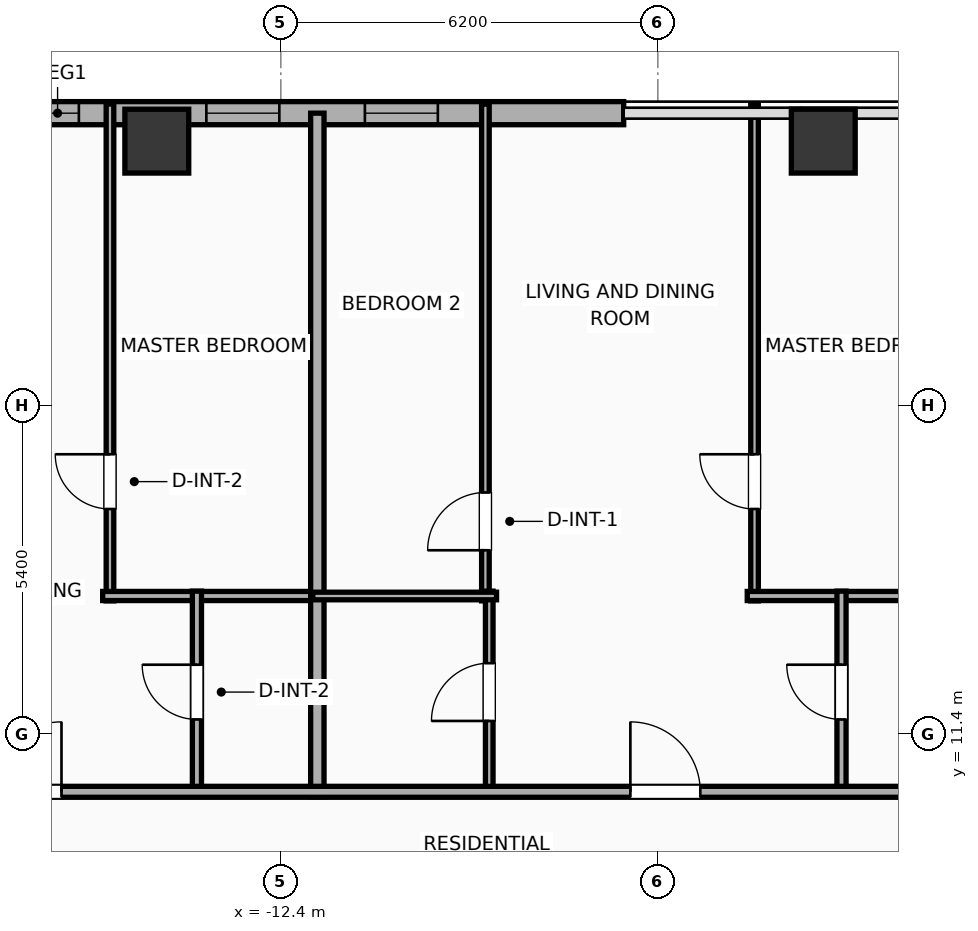
"""IFC4 building model, lengths in metres.
Left out: names, types, materials, properties, quantities, classifications, styles, units other than length and angle.
Written with IfcOpenShell. Run it as: python <this file> out.ifc"""

import sys

from ifc_helpers import new_model, si_unit, direction, frame, frame_2d, origin, origin_2d, place, context, subcontext, project, spatial, rectangle, hollow_rectangle, extrude, element, fill, save


model = new_model("IFC4")
c1 = context("Model", 3, precision=1e-05, world=origin(), true_north=direction((0.0, 1.0)))
c2 = subcontext(c1, "Body", "Model", "MODEL_VIEW")
j1 = project(units=[si_unit("LENGTHUNIT", "METRE"), si_unit("PLANEANGLEUNIT", "RADIAN")], contexts=[c1])
p1 = place(None, origin())
s1 = spatial("IfcSite", under=j1, at=p1, CompositionType="ELEMENT")
p2 = place(p1, origin())
s2 = spatial("IfcBuilding", under=s1, at=p2, CompositionType="ELEMENT")
p3 = place(p2, frame((0.0, 0.0, 117.0)))
s3 = spatial("IfcBuildingStorey", under=s2, at=p3, CompositionType="ELEMENT", Elevation=117.0)
for number, where, z_axis, x_axis in (
    (1, (-3.48, 21.15, 0.0), (0.0, 0.0, 1.0), (1.0, 0.0, 0.0)),
    (2, (-14.44, 21.15, 0.0), (0.0, 0.0, 1.0), (1.0, 0.0, 0.0)),
):
    element("IfcColumn", number, at=place(p3, frame(where, z_axis=z_axis, x_axis=x_axis)), inside=s3, PredefinedType="COLUMN", context=c2, shape_type="SweptSolid", body=[
        extrude(hollow_rectangle(XDim=1.05, YDim=1.05, WallThickness=0.036, at=origin_2d()), origin(), (0.0, 0.0, 1.0), 3.9),
    ])
p4 = place(p3, frame((-25.381, 21.61, 0.0), z_axis=(0.0, 0.0, 1.0), x_axis=(1.0, 0.0, 0.0)))
e3 = element("IfcWall", 3, at=p4, inside=s3, PredefinedType="ELEMENTEDWALL", context=c2, shape_type="SweptSolid", body=[
    extrude(rectangle(XDim=18.619, YDim=0.38, at=frame_2d((9.31, 0.0))), origin(), (0.0, 0.0, 1.0), 3.65),
])
p5 = place(p4, frame((7.26, 0.0, 0.75)))
e4 = element("IfcOpeningElement", 4, at=p5, cuts=e3, PredefinedType="OPENING", context=c2, shape_type="SweptSolid", body=[
    extrude(rectangle(XDim=2.4, YDim=2.1, at=frame_2d((1.2, 1.05))), frame((0.0, 0.2, 0.0), z_axis=(0.0, -1.0, 0.0), x_axis=(1.0, 0.0, 0.0)), (0.0, 0.0, 1.0), 0.4),
])
p6 = place(p4, frame((1.336, 0.0, 0.75)))
e5 = element("IfcOpeningElement", 5, at=p6, cuts=e3, PredefinedType="OPENING", context=c2, shape_type="SweptSolid", body=[
    extrude(rectangle(XDim=1.2, YDim=2.05, at=frame_2d((0.6, 1.025))), frame((0.0, 0.2, 0.0), z_axis=(0.0, -1.0, 0.0), x_axis=(1.0, 0.0, 0.0)), (0.0, 0.0, 1.0), 0.4),
])
p7 = place(p4, frame((3.952, 0.0, 0.75)))
e6 = element("IfcOpeningElement", 6, at=p7, cuts=e3, PredefinedType="OPENING", context=c2, shape_type="SweptSolid", body=[
    extrude(rectangle(XDim=1.2, YDim=2.05, at=frame_2d((0.6, 1.025))), frame((0.0, 0.2, 0.0), z_axis=(0.0, -1.0, 0.0), x_axis=(1.0, 0.0, 0.0)), (0.0, 0.0, 1.0), 0.4),
])
p8 = place(p4, frame((11.756, 0.0, 0.75)))
e7 = element("IfcOpeningElement", 7, at=p8, cuts=e3, PredefinedType="OPENING", context=c2, shape_type="SweptSolid", body=[
    extrude(rectangle(XDim=1.2, YDim=2.05, at=frame_2d((0.6, 1.025))), frame((0.0, 0.2, 0.0), z_axis=(0.0, -1.0, 0.0), x_axis=(1.0, 0.0, 0.0)), (0.0, 0.0, 1.0), 0.4),
])
p9 = place(p4, frame((14.363, 0.0, 0.75)))
e8 = element("IfcOpeningElement", 8, at=p9, cuts=e3, PredefinedType="OPENING", context=c2, shape_type="SweptSolid", body=[
    extrude(rectangle(XDim=1.2, YDim=2.05, at=frame_2d((0.6, 1.025))), frame((0.0, 0.2, 0.0), z_axis=(0.0, -1.0, 0.0), x_axis=(1.0, 0.0, 0.0)), (0.0, 0.0, 1.0), 0.4),
])
p10 = place(p3, frame((-15.21, 13.59, 0.0), z_axis=(0.0, 0.0, 1.0), x_axis=(0.0, 1.0, 0.0)))
e9 = element("IfcWall", 9, at=p10, inside=s3, PredefinedType="PARTITIONING", context=c2, shape_type="SweptSolid", body=[
    extrude(rectangle(XDim=8.17, YDim=0.125, at=frame_2d((4.085, 0.0))), origin(), (0.0, 0.0, 1.0), 3.04),
])
p11 = place(p10, frame((1.511, 0.0, 0.0)))
e10 = element("IfcOpeningElement", 10, at=p11, cuts=e9, PredefinedType="OPENING", context=c2, shape_type="SweptSolid", body=[
    extrude(rectangle(XDim=0.9, YDim=2.05, at=frame_2d((0.45, 1.025))), frame((0.0, 0.073, 0.0), z_axis=(0.0, -1.0, 0.0), x_axis=(1.0, 0.0, 0.0)), (0.0, 0.0, 1.0), 0.145),
])
p12 = place(p3, frame((-15.33, 13.67, 0.0), z_axis=(0.0, 0.0, 1.0), x_axis=(1.0, 0.0, 0.0)))
e11 = element("IfcWall", 11, at=p12, inside=s3, PredefinedType="PLUMBINGWALL", context=c2, shape_type="SweptSolid", body=[
    extrude(rectangle(XDim=3.605, YDim=0.15, at=frame_2d((1.802, 0.0))), origin(), (0.0, 0.0, 1.0), 3.65),
])
p13 = place(p3, frame((-13.78, 10.43, 0.0), z_axis=(0.0, 0.0, 1.0), x_axis=(0.0, 1.0, 0.0)))
e12 = element("IfcWall", 12, at=p13, inside=s3, PredefinedType="PLUMBINGWALL", context=c2, shape_type="SweptSolid", body=[
    extrude(rectangle(XDim=3.32, YDim=0.15, at=frame_2d((1.66, 0.0))), origin(), (0.0, 0.0, 1.0), 3.65),
])
p14 = place(p13, frame((1.21, 0.0, 0.0)))
e13 = element("IfcOpeningElement", 13, at=p14, cuts=e12, PredefinedType="OPENING", context=c2, shape_type="SweptSolid", body=[
    extrude(rectangle(XDim=0.9, YDim=2.05, at=frame_2d((0.45, 1.025))), frame((0.0, 0.085, 0.0), z_axis=(0.0, -1.0, 0.0), x_axis=(1.0, 0.0, 0.0)), (0.0, 0.0, 1.0), 0.17),
])
p15 = place(p3, frame((-11.8, 10.37, 0.0), z_axis=(0.0, 0.0, 1.0), x_axis=(0.0, 1.0, 0.0)))
e14 = element("IfcWall", 14, at=p15, inside=s3, PredefinedType="PARTITIONING", context=c2, shape_type="SweptSolid", body=[
    extrude(rectangle(XDim=11.24, YDim=0.22, at=frame_2d((5.62, 0.0))), origin(), (0.0, 0.0, 1.0), 3.65),
])
p16 = place(p3, frame((-9.036, 13.59, 0.0), z_axis=(0.0, 0.0, 1.0), x_axis=(0.0, 1.0, 0.0)))
e15 = element("IfcWall", 15, at=p16, inside=s3, PredefinedType="PARTITIONING", context=c2, shape_type="SweptSolid", body=[
    extrude(rectangle(XDim=8.17, YDim=0.125, at=frame_2d((4.085, 0.0))), origin(), (0.0, 0.0, 1.0), 3.65),
])
p17 = place(p16, frame((0.832, 0.0, 0.0)))
e16 = element("IfcOpeningElement", 16, at=p17, cuts=e15, PredefinedType="OPENING", context=c2, shape_type="SweptSolid", body=[
    extrude(rectangle(XDim=0.95, YDim=2.05, at=frame_2d((0.475, 1.025))), frame((0.0, 0.073, 0.0), z_axis=(0.0, -1.0, 0.0), x_axis=(1.0, 0.0, 0.0)), (0.0, 0.0, 1.0), 0.145),
])
p18 = place(p3, frame((-4.61, 13.59, 0.0), z_axis=(0.0, 0.0, 1.0), x_axis=(0.0, 1.0, 0.0)))
e17 = element("IfcWall", 17, at=p18, inside=s3, PredefinedType="PARTITIONING", context=c2, shape_type="SweptSolid", body=[
    extrude(rectangle(XDim=8.17, YDim=0.125, at=frame_2d((4.085, 0.0))), origin(), (0.0, 0.0, 1.0), 3.65),
])
p19 = place(p18, frame((1.511, 0.0, 0.0)))
e18 = element("IfcOpeningElement", 18, at=p19, cuts=e17, PredefinedType="OPENING", context=c2, shape_type="SweptSolid", body=[
    extrude(rectangle(XDim=0.9, YDim=2.05, at=frame_2d((0.45, 1.025))), frame((0.0, 0.073, 0.0), z_axis=(0.0, -1.0, 0.0), x_axis=(1.0, 0.0, 0.0)), (0.0, 0.0, 1.0), 0.145),
])
p20 = place(p3, frame((-4.73, 13.67, 0.0), z_axis=(0.0, 0.0, 1.0), x_axis=(1.0, 0.0, 0.0)))
e19 = element("IfcWall", 19, at=p20, inside=s3, PredefinedType="PLUMBINGWALL", context=c2, shape_type="SweptSolid", body=[
    extrude(rectangle(XDim=3.605, YDim=0.15, at=frame_2d((1.802, 0.0))), origin(), (0.0, 0.0, 1.0), 3.65),
])
p21 = place(p3, frame((-8.973, 10.43, 0.0), z_axis=(0.0, 0.0, 1.0), x_axis=(0.0, 1.0, 0.0)))
e20 = element("IfcWall", 20, at=p21, inside=s3, PredefinedType="PARTITIONING", context=c2, shape_type="SweptSolid", body=[
    extrude(rectangle(XDim=3.32, YDim=0.125, at=frame_2d((1.66, 0.0))), origin(), (0.0, 0.0, 1.0), 3.65),
])
p22 = place(p21, frame((1.185, 0.0, 0.0)))
e21 = element("IfcOpeningElement", 21, at=p22, cuts=e20, PredefinedType="OPENING", context=c2, shape_type="SweptSolid", body=[
    extrude(rectangle(XDim=0.95, YDim=2.05, at=frame_2d((0.475, 1.025))), frame((0.0, 0.073, 0.0), z_axis=(0.0, -1.0, 0.0), x_axis=(1.0, 0.0, 0.0)), (0.0, 0.0, 1.0), 0.145),
])
p23 = place(p3, frame((-11.875, 13.67, 0.0), z_axis=(0.0, 0.0, 1.0), x_axis=(1.0, 0.0, 0.0)))
e22 = element("IfcWall", 22, at=p23, inside=s3, PredefinedType="PARTITIONING", context=c2, shape_type="SweptSolid", body=[
    extrude(rectangle(XDim=3.022, YDim=0.125, at=frame_2d((1.511, 0.0))), origin(), (0.0, 0.0, 1.0), 3.65),
])
p24 = place(p3, frame((-3.18, 10.43, 0.0), z_axis=(0.0, 0.0, 1.0), x_axis=(0.0, 1.0, 0.0)))
e23 = element("IfcWall", 23, at=p24, inside=s3, PredefinedType="PLUMBINGWALL", context=c2, shape_type="SweptSolid", body=[
    extrude(rectangle(XDim=3.32, YDim=0.15, at=frame_2d((1.66, 0.0))), origin(), (0.0, 0.0, 1.0), 3.65),
])
p25 = place(p24, frame((1.21, 0.0, 0.0)))
e24 = element("IfcOpeningElement", 24, at=p25, cuts=e23, PredefinedType="OPENING", context=c2, shape_type="SweptSolid", body=[
    extrude(rectangle(XDim=0.9, YDim=2.05, at=frame_2d((0.45, 1.025))), frame((0.0, 0.085, 0.0), z_axis=(0.0, -1.0, 0.0), x_axis=(1.0, 0.0, 0.0)), (0.0, 0.0, 1.0), 0.17),
])
p26 = place(p3, frame((-29.21, 10.45, 0.0), z_axis=(0.0, 0.0, 1.0), x_axis=(1.0, 0.0, 0.0)))
e25 = element("IfcWall", 25, at=p26, inside=s3, PredefinedType="PARTITIONING", context=c2, shape_type="SweptSolid", body=[
    extrude(rectangle(XDim=62.42, YDim=0.18, at=frame_2d((31.21, 0.0))), origin(), (0.0, 0.0, 1.0), 3.65),
])
p27 = place(p26, frame((3.083, 0.0, 0.0)))
e26 = element("IfcOpeningElement", 26, at=p27, cuts=e25, PredefinedType="OPENING", context=c2, shape_type="SweptSolid", body=[
    extrude(rectangle(XDim=0.9, YDim=2.05, at=frame_2d((0.45, 1.025))), frame((0.0, 0.1, 0.0), z_axis=(0.0, -1.0, 0.0), x_axis=(1.0, 0.0, 0.0)), (0.0, 0.0, 1.0), 0.2),
])
p28 = place(p26, frame((12.052, 0.0, 0.0)))
e27 = element("IfcOpeningElement", 27, at=p28, cuts=e25, PredefinedType="OPENING", context=c2, shape_type="SweptSolid", body=[
    extrude(rectangle(XDim=1.15, YDim=2.05, at=frame_2d((0.575, 1.025))), frame((0.0, 0.1, 0.0), z_axis=(0.0, -1.0, 0.0), x_axis=(1.0, 0.0, 0.0)), (0.0, 0.0, 1.0), 0.2),
])
p29 = place(p26, frame((22.558, 0.0, 0.0)))
e28 = element("IfcOpeningElement", 28, at=p29, cuts=e25, PredefinedType="OPENING", context=c2, shape_type="SweptSolid", body=[
    extrude(rectangle(XDim=1.15, YDim=2.05, at=frame_2d((0.575, 1.025))), frame((0.0, 0.1, 0.0), z_axis=(0.0, -1.0, 0.0), x_axis=(1.0, 0.0, 0.0)), (0.0, 0.0, 1.0), 0.2),
])
p30 = place(p26, frame((33.219, 0.0, 0.0)))
e29 = element("IfcOpeningElement", 29, at=p30, cuts=e25, PredefinedType="OPENING", context=c2, shape_type="SweptSolid", body=[
    extrude(rectangle(XDim=1.15, YDim=2.05, at=frame_2d((0.575, 1.025))), frame((0.0, 0.1, 0.0), z_axis=(0.0, -1.0, 0.0), x_axis=(1.0, 0.0, 0.0)), (0.0, 0.0, 1.0), 0.2),
])
p31 = place(p26, frame((43.725, 0.0, 0.0)))
e30 = element("IfcOpeningElement", 30, at=p31, cuts=e25, PredefinedType="OPENING", context=c2, shape_type="SweptSolid", body=[
    extrude(rectangle(XDim=1.15, YDim=2.05, at=frame_2d((0.575, 1.025))), frame((0.0, 0.1, 0.0), z_axis=(0.0, -1.0, 0.0), x_axis=(1.0, 0.0, 0.0)), (0.0, 0.0, 1.0), 0.2),
])
p32 = place(p26, frame((52.232, 0.0, 0.0)))
e31 = element("IfcOpeningElement", 31, at=p32, cuts=e25, PredefinedType="OPENING", context=c2, shape_type="SweptSolid", body=[
    extrude(rectangle(XDim=0.9, YDim=2.05, at=frame_2d((0.45, 1.025))), frame((0.0, 0.1, 0.0), z_axis=(0.0, -1.0, 0.0), x_axis=(1.0, 0.0, 0.0)), (0.0, 0.0, 1.0), 0.2),
])
p33 = place(p26, frame((58.868, 0.0, 0.0)))
e32 = element("IfcOpeningElement", 32, at=p33, cuts=e25, PredefinedType="OPENING", context=c2, shape_type="SweptSolid", body=[
    extrude(rectangle(XDim=0.9, YDim=2.05, at=frame_2d((0.45, 1.025))), frame((0.0, 0.1, 0.0), z_axis=(0.0, -1.0, 0.0), x_axis=(1.0, 0.0, 0.0)), (0.0, 0.0, 1.0), 0.2),
])
p34 = place(p5, origin())
e33 = element("IfcWindow", 33, at=p34, inside=s3, PartitioningType="SINGLE_PANEL", PredefinedType="WINDOW", context=c2, shape_type="SweptSolid", body=[
    extrude(rectangle(XDim=2.4, YDim=2.1, at=frame_2d((1.2, 1.05))), frame((0.0, 0.03, 0.0), z_axis=(0.0, -1.0, 0.0), x_axis=(1.0, 0.0, 0.0)), (0.0, 0.0, 1.0), 0.06),
])
fill(e4, e33)
p35 = place(p8, origin())
e34 = element("IfcWindow", 34, at=p35, inside=s3, PartitioningType="SINGLE_PANEL", PredefinedType="WINDOW", context=c2, shape_type="SweptSolid", body=[
    extrude(rectangle(XDim=1.2, YDim=2.05, at=frame_2d((0.6, 1.025))), frame((0.0, 0.03, 0.0), z_axis=(0.0, -1.0, 0.0), x_axis=(1.0, 0.0, 0.0)), (0.0, 0.0, 1.0), 0.06),
])
fill(e7, e34)
p36 = place(p9, origin())
e35 = element("IfcWindow", 35, at=p36, inside=s3, PartitioningType="SINGLE_PANEL", PredefinedType="WINDOW", context=c2, shape_type="SweptSolid", body=[
    extrude(rectangle(XDim=1.2, YDim=2.05, at=frame_2d((0.6, 1.025))), frame((0.0, 0.03, 0.0), z_axis=(0.0, -1.0, 0.0), x_axis=(1.0, 0.0, 0.0)), (0.0, 0.0, 1.0), 0.06),
])
fill(e8, e35)
p37 = place(p11, origin())
e36 = element("IfcDoor", 36, at=p37, inside=s3, OperationType="SINGLE_SWING_RIGHT", PredefinedType="DOOR", context=c2, shape_type="SweptSolid", body=[
    extrude(rectangle(XDim=0.9, YDim=2.05, at=frame_2d((0.45, 1.025))), frame((0.0, 0.025, 0.0), z_axis=(0.0, -1.0, 0.0), x_axis=(1.0, 0.0, 0.0)), (0.0, 0.0, 1.0), 0.05),
])
fill(e10, e36)
p38 = place(p14, origin())
e37 = element("IfcDoor", 37, at=p38, inside=s3, OperationType="SINGLE_SWING_RIGHT", PredefinedType="DOOR", context=c2, shape_type="SweptSolid", body=[
    extrude(rectangle(XDim=0.9, YDim=2.05, at=frame_2d((0.45, 1.025))), frame((0.0, 0.025, 0.0), z_axis=(0.0, -1.0, 0.0), x_axis=(1.0, 0.0, 0.0)), (0.0, 0.0, 1.0), 0.05),
])
fill(e13, e37)
p39 = place(p17, origin())
e38 = element("IfcDoor", 38, at=p39, inside=s3, OperationType="SINGLE_SWING_LEFT", PredefinedType="DOOR", context=c2, shape_type="SweptSolid", body=[
    extrude(rectangle(XDim=0.95, YDim=2.05, at=frame_2d((0.475, 1.025))), frame((0.0, 0.025, 0.0), z_axis=(0.0, -1.0, 0.0), x_axis=(1.0, 0.0, 0.0)), (0.0, 0.0, 1.0), 0.05),
])
fill(e16, e38)
p40 = place(p19, origin())
e39 = element("IfcDoor", 39, at=p40, inside=s3, OperationType="SINGLE_SWING_RIGHT", PredefinedType="DOOR", context=c2, shape_type="SweptSolid", body=[
    extrude(rectangle(XDim=0.9, YDim=2.05, at=frame_2d((0.45, 1.025))), frame((0.0, 0.025, 0.0), z_axis=(0.0, -1.0, 0.0), x_axis=(1.0, 0.0, 0.0)), (0.0, 0.0, 1.0), 0.05),
])
fill(e18, e39)
p41 = place(p22, origin())
e40 = element("IfcDoor", 40, at=p41, inside=s3, OperationType="SINGLE_SWING_LEFT", PredefinedType="DOOR", context=c2, shape_type="SweptSolid", body=[
    extrude(rectangle(XDim=0.95, YDim=2.05, at=frame_2d((0.475, 1.025))), frame((0.0, 0.025, 0.0), z_axis=(0.0, -1.0, 0.0), x_axis=(1.0, 0.0, 0.0)), (0.0, 0.0, 1.0), 0.05),
])
fill(e21, e40)
p42 = place(p25, origin())
e41 = element("IfcDoor", 41, at=p42, inside=s3, OperationType="SINGLE_SWING_RIGHT", PredefinedType="DOOR", context=c2, shape_type="SweptSolid", body=[
    extrude(rectangle(XDim=0.9, YDim=2.05, at=frame_2d((0.45, 1.025))), frame((0.0, 0.025, 0.0), z_axis=(0.0, -1.0, 0.0), x_axis=(1.0, 0.0, 0.0)), (0.0, 0.0, 1.0), 0.05),
])
fill(e24, e41)
p43 = place(p28, origin())
e42 = element("IfcDoor", 42, at=p43, inside=s3, OperationType="SINGLE_SWING_RIGHT", PredefinedType="DOOR", context=c2, shape_type="SweptSolid", body=[
    extrude(rectangle(XDim=1.15, YDim=2.05, at=frame_2d((0.575, 1.025))), frame((0.0, 0.025, 0.0), z_axis=(0.0, -1.0, 0.0), x_axis=(1.0, 0.0, 0.0)), (0.0, 0.0, 1.0), 0.05),
])
fill(e27, e42)
p44 = place(p29, origin())
e43 = element("IfcDoor", 43, at=p44, inside=s3, OperationType="SINGLE_SWING_LEFT", PredefinedType="DOOR", context=c2, shape_type="SweptSolid", body=[
    extrude(rectangle(XDim=1.15, YDim=2.05, at=frame_2d((0.575, 1.025))), frame((0.0, 0.025, 0.0), z_axis=(0.0, -1.0, 0.0), x_axis=(1.0, 0.0, 0.0)), (0.0, 0.0, 1.0), 0.05),
])
fill(e28, e43)
save(model, sys.argv[1])
